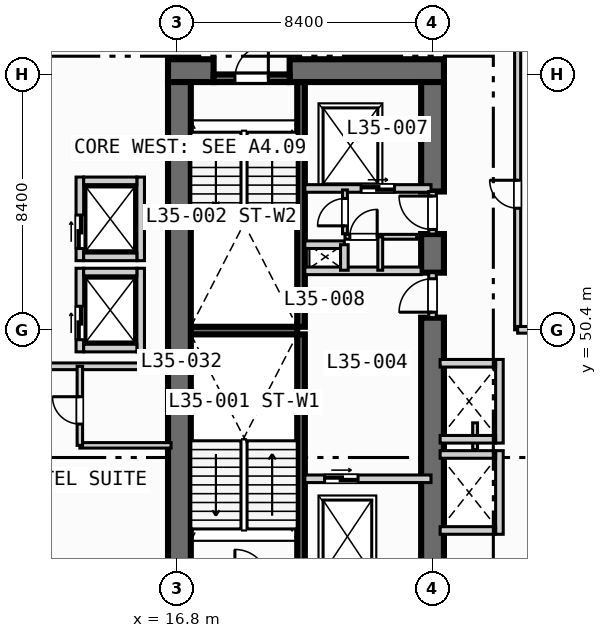
"""IFC4 building model, lengths in metres.
Left out: names, types, materials, properties, quantities, classifications, styles, units other than length and angle.
Written with IfcOpenShell. Run it as: python <this file> out.ifc"""

import sys

from ifc_helpers import new_model, si_unit, direction, frame, frame_2d, origin, place, context, subcontext, project, spatial, rectangle, extrude, element, fill, save


model = new_model("IFC4")
c1 = context("Model", 3, precision=1e-05, world=origin(), true_north=direction((0.0, 1.0)))
c2 = subcontext(c1, "Body", "Model", "MODEL_VIEW")
j1 = project(units=[si_unit("LENGTHUNIT", "METRE"), si_unit("PLANEANGLEUNIT", "RADIAN")], contexts=[c1])
p1 = place(None, origin())
s1 = spatial("IfcSite", under=j1, at=p1, CompositionType="ELEMENT")
p2 = place(p1, origin())
s2 = spatial("IfcBuilding", under=s1, at=p2, CompositionType="ELEMENT")
p3 = place(p2, frame((0.0, 0.0, 145.6)))
s3 = spatial("IfcBuildingStorey", under=s2, at=p3, CompositionType="ELEMENT", Elevation=145.6)
for number, where, z_axis, x_axis in (
    (1, (20.875, 42.2, 0.0), (0.0, 0.0, 1.0), (0.0, 1.0, 0.0)),
    (2, (20.875, 50.5, 0.0), (0.0, 0.0, 1.0), (0.0, 1.0, 0.0)),
):
    element("IfcWall", number, at=place(p3, frame(where, z_axis=z_axis, x_axis=x_axis)), inside=s3, PredefinedType="SOLIDWALL", context=c2, shape_type="SweptSolid", body=[
        extrude(rectangle(XDim=8.05, YDim=0.25, at=frame_2d((4.025, 0.0))), origin(), (0.0, 0.0, 1.0), 3.55),
    ])
p4 = place(p3, frame((17.25, 50.375, 0.0), z_axis=(0.0, 0.0, 1.0), x_axis=(1.0, 0.0, 0.0)))
e3 = element("IfcWall", 3, at=p4, inside=s3, PredefinedType="SOLIDWALL", context=c2, shape_type="SweptSolid", body=[
    extrude(rectangle(XDim=3.5, YDim=0.25, at=frame_2d((1.75, 0.0))), origin(), (0.0, 0.0, 1.0), 3.55),
])
p5 = place(p3, frame((16.5, 58.925, 0.0), z_axis=(0.0, 0.0, 1.0), x_axis=(1.0, 0.0, 0.0)))
e4 = element("IfcWall", 4, at=p5, inside=s3, PredefinedType="SHEAR", context=c2, shape_type="SweptSolid", body=[
    extrude(rectangle(XDim=1.5, YDim=0.75, at=frame_2d((0.75, 0.0))), origin(), (0.0, 0.0, 1.0), 3.55),
])
p6 = place(p3, frame((20.5, 58.925, 0.0), z_axis=(0.0, 0.0, 1.0), x_axis=(1.0, 0.0, 0.0)))
e5 = element("IfcWall", 5, at=p6, inside=s3, PredefinedType="SHEAR", context=c2, shape_type="SweptSolid", body=[
    extrude(rectangle(XDim=5.075, YDim=0.75, at=frame_2d((2.538, 0.0))), origin(), (0.0, 0.0, 1.0), 3.55),
])
p7 = place(p3, frame((16.875, 42.2, 0.0), z_axis=(0.0, 0.0, 1.0), x_axis=(0.0, 1.0, 0.0)))
e6 = element("IfcWall", 6, at=p7, inside=s3, PredefinedType="SHEAR", context=c2, shape_type="SweptSolid", body=[
    extrude(rectangle(XDim=16.35, YDim=0.75, at=frame_2d((8.175, 0.0))), origin(), (0.0, 0.0, 1.0), 3.55),
])
p8 = place(p3, frame((25.2, 42.2, 0.0), z_axis=(0.0, 0.0, 1.0), x_axis=(0.0, 1.0, 0.0)))
e7 = element("IfcWall", 7, at=p8, inside=s3, PredefinedType="SHEAR", context=c2, shape_type="SweptSolid", body=[
    extrude(rectangle(XDim=8.6, YDim=0.75, at=frame_2d((4.3, 0.0))), origin(), (0.0, 0.0, 1.0), 3.55),
])
p9 = place(p3, frame((25.2, 52.28, 0.0), z_axis=(0.0, 0.0, 1.0), x_axis=(0.0, 1.0, 0.0)))
e8 = element("IfcWall", 8, at=p9, inside=s3, PredefinedType="SHEAR", context=c2, shape_type="SweptSolid", body=[
    extrude(rectangle(XDim=1.27, YDim=0.75, at=frame_2d((0.635, 0.0))), origin(), (0.0, 0.0, 1.0), 3.55),
])
p10 = place(p3, frame((25.2, 54.95, 0.0), z_axis=(0.0, 0.0, 1.0), x_axis=(0.0, 1.0, 0.0)))
e9 = element("IfcWall", 9, at=p10, inside=s3, PredefinedType="SHEAR", context=c2, shape_type="SweptSolid", body=[
    extrude(rectangle(XDim=3.6, YDim=0.75, at=frame_2d((1.8, 0.0))), origin(), (0.0, 0.0, 1.0), 3.55),
])
p11 = place(p3, frame((18.0, 58.675, 0.0), z_axis=(0.0, 0.0, 1.0), x_axis=(1.0, 0.0, 0.0)))
e10 = element("IfcWall", 10, at=p11, inside=s3, PredefinedType="SOLIDWALL", context=c2, shape_type="SweptSolid", body=[
    extrude(rectangle(XDim=2.5, YDim=0.25, at=frame_2d((1.25, 0.0))), origin(), (0.0, 0.0, 1.0), 3.55),
])
p12 = place(p11, frame((0.7, 0.0, 0.0)))
e11 = element("IfcOpeningElement", 11, at=p12, cuts=e10, PredefinedType="OPENING", context=c2, shape_type="SweptSolid", body=[
    extrude(rectangle(XDim=1.1, YDim=2.15, at=frame_2d((0.55, 1.075))), frame((0.0, 0.135, 0.0), z_axis=(0.0, -1.0, 0.0), x_axis=(1.0, 0.0, 0.0)), (0.0, 0.0, 1.0), 0.27),
])
p13 = place(p3, frame((21.0, 45.5, 0.0), z_axis=(0.0, 0.0, 1.0), x_axis=(1.0, 0.0, 0.0)))
e12 = element("IfcWall", 12, at=p13, inside=s3, PredefinedType="SOLIDWALL", context=c2, shape_type="SweptSolid", body=[
    extrude(rectangle(XDim=4.15, YDim=0.25, at=frame_2d((2.075, 0.0))), origin(), (0.0, 0.0, 1.0), 3.55),
])
p14 = place(p13, frame((0.65, 0.0, 0.0)))
e13 = element("IfcOpeningElement", 13, at=p14, cuts=e12, PredefinedType="OPENING", context=c2, shape_type="SweptSolid", body=[
    extrude(rectangle(XDim=1.1, YDim=2.15, at=frame_2d((0.55, 1.075))), frame((0.0, 0.135, 0.0), z_axis=(0.0, -1.0, 0.0), x_axis=(1.0, 0.0, 0.0)), (0.0, 0.0, 1.0), 0.27),
])
p15 = place(p3, frame((25.2, 50.8, 0.0), z_axis=(0.0, 0.0, 1.0), x_axis=(0.0, 1.0, 0.0)))
e14 = element("IfcWall", 14, at=p15, inside=s3, PredefinedType="SOLIDWALL", context=c2, shape_type="SweptSolid", body=[
    extrude(rectangle(XDim=1.48, YDim=0.25, at=frame_2d((0.74, 0.0))), origin(), (0.0, 0.0, 1.0), 3.55),
])
p16 = place(p15, frame((0.18, 0.0, 0.0)))
e15 = element("IfcOpeningElement", 15, at=p16, cuts=e14, PredefinedType="OPENING", context=c2, shape_type="SweptSolid", body=[
    extrude(rectangle(XDim=1.1, YDim=2.15, at=frame_2d((0.55, 1.075))), frame((0.0, 0.135, 0.0), z_axis=(0.0, -1.0, 0.0), x_axis=(1.0, 0.0, 0.0)), (0.0, 0.0, 1.0), 0.27),
])
p17 = place(p3, frame((21.0, 52.34, 0.0), z_axis=(0.0, 0.0, 1.0), x_axis=(1.0, 0.0, 0.0)))
e16 = element("IfcWall", 16, at=p17, inside=s3, PredefinedType="SOLIDWALL", context=c2, shape_type="SweptSolid", body=[
    extrude(rectangle(XDim=3.825, YDim=0.25, at=frame_2d((1.913, 0.0))), origin(), (0.0, 0.0, 1.0), 3.55),
])
p18 = place(p3, frame((21.0, 55.05, 0.0), z_axis=(0.0, 0.0, 1.0), x_axis=(1.0, 0.0, 0.0)))
e17 = element("IfcWall", 17, at=p18, inside=s3, PredefinedType="SOLIDWALL", context=c2, shape_type="SweptSolid", body=[
    extrude(rectangle(XDim=4.15, YDim=0.25, at=frame_2d((2.075, 0.0))), origin(), (0.0, 0.0, 1.0), 3.55),
])
p19 = place(p18, frame((1.85, 0.0, 0.0)))
e18 = element("IfcOpeningElement", 18, at=p19, cuts=e17, PredefinedType="OPENING", context=c2, shape_type="SweptSolid", body=[
    extrude(rectangle(XDim=1.1, YDim=2.15, at=frame_2d((0.55, 1.075))), frame((0.0, 0.135, 0.0), z_axis=(0.0, -1.0, 0.0), x_axis=(1.0, 0.0, 0.0)), (0.0, 0.0, 1.0), 0.27),
])
p20 = place(p3, frame((25.2, 53.55, 0.0), z_axis=(0.0, 0.0, 1.0), x_axis=(0.0, 1.0, 0.0)))
e19 = element("IfcWall", 19, at=p20, inside=s3, PredefinedType="SOLIDWALL", context=c2, shape_type="SweptSolid", body=[
    extrude(rectangle(XDim=1.4, YDim=0.25, at=frame_2d((0.7, 0.0))), origin(), (0.0, 0.0, 1.0), 3.55),
])
p21 = place(p20, frame((0.15, 0.0, 0.0)))
e20 = element("IfcOpeningElement", 20, at=p21, cuts=e19, PredefinedType="OPENING", context=c2, shape_type="SweptSolid", body=[
    extrude(rectangle(XDim=1.1, YDim=2.15, at=frame_2d((0.55, 1.075))), frame((0.0, 0.135, 0.0), z_axis=(0.0, -1.0, 0.0), x_axis=(1.0, 0.0, 0.0)), (0.0, 0.0, 1.0), 0.27),
])
p22 = place(p3, frame((21.0, 53.2, 0.0), z_axis=(0.0, 0.0, 1.0), x_axis=(1.0, 0.0, 0.0)))
e21 = element("IfcWall", 21, at=p22, inside=s3, PredefinedType="SOLIDWALL", context=c2, shape_type="SweptSolid", body=[
    extrude(rectangle(XDim=1.3, YDim=0.25, at=frame_2d((0.65, 0.0))), origin(), (0.0, 0.0, 1.0), 3.55),
])
p23 = place(p3, frame((22.3, 52.36, 0.0), z_axis=(0.0, 0.0, 1.0), x_axis=(0.0, 1.0, 0.0)))
e22 = element("IfcWall", 22, at=p23, inside=s3, PredefinedType="SOLIDWALL", context=c2, shape_type="SweptSolid", body=[
    extrude(rectangle(XDim=0.84, YDim=0.25, at=frame_2d((0.42, 0.0))), origin(), (0.0, 0.0, 1.0), 3.55),
])
p24 = place(p3, frame((22.32, 53.56, 0.0), z_axis=(0.0, 0.0, 1.0), x_axis=(0.0, 1.0, 0.0)))
e23 = element("IfcWall", 23, at=p24, inside=s3, PredefinedType="PARTITIONING", context=c2, shape_type="SweptSolid", body=[
    extrude(rectangle(XDim=1.44, YDim=0.16, at=frame_2d((0.72, 0.0))), origin(), (0.0, 0.0, 1.0), 3.55),
])
p25 = place(p24, frame((0.26, 0.0, 0.0)))
e24 = element("IfcOpeningElement", 24, at=p25, cuts=e23, PredefinedType="OPENING", context=c2, shape_type="SweptSolid", body=[
    extrude(rectangle(XDim=0.9, YDim=2.1, at=frame_2d((0.45, 1.05))), frame((0.0, 0.09, 0.0), z_axis=(0.0, -1.0, 0.0), x_axis=(1.0, 0.0, 0.0)), (0.0, 0.0, 1.0), 0.18),
])
p26 = place(p3, frame((22.32, 53.46, 0.0), z_axis=(0.0, 0.0, 1.0), x_axis=(1.0, 0.0, 0.0)))
e25 = element("IfcWall", 25, at=p26, inside=s3, PredefinedType="PARTITIONING", context=c2, shape_type="SweptSolid", body=[
    extrude(rectangle(XDim=2.36, YDim=0.16, at=frame_2d((1.18, 0.0))), origin(), (0.0, 0.0, 1.0), 3.55),
])
p27 = place(p26, frame((0.16, 0.0, 0.0)))
e26 = element("IfcOpeningElement", 26, at=p27, cuts=e25, PredefinedType="OPENING", context=c2, shape_type="SweptSolid", body=[
    extrude(rectangle(XDim=0.9, YDim=2.1, at=frame_2d((0.45, 1.05))), frame((0.0, 0.09, 0.0), z_axis=(0.0, -1.0, 0.0), x_axis=(1.0, 0.0, 0.0)), (0.0, 0.0, 1.0), 0.18),
])
p28 = place(p3, frame((23.48, 52.36, 0.0), z_axis=(0.0, 0.0, 1.0), x_axis=(0.0, 1.0, 0.0)))
e27 = element("IfcWall", 27, at=p28, inside=s3, PredefinedType="PARTITIONING", context=c2, shape_type="SweptSolid", body=[
    extrude(rectangle(XDim=1.1, YDim=0.16, at=frame_2d((0.55, 0.0))), origin(), (0.0, 0.0, 1.0), 3.55),
])
p29 = place(p3, frame((13.6, 49.675, 0.0), z_axis=(0.0, 0.0, 1.0), x_axis=(0.0, 1.0, 0.0)))
e28 = element("IfcWall", 28, at=p29, inside=s3, PredefinedType="SOLIDWALL", context=c2, shape_type="SweptSolid", body=[
    extrude(rectangle(XDim=2.75, YDim=0.25, at=frame_2d((1.375, 0.0))), origin(), (0.0, 0.0, 1.0), 3.55),
])
p30 = place(p29, frame((0.4, 0.0, 0.0)))
e29 = element("IfcOpeningElement", 29, at=p30, cuts=e28, PredefinedType="OPENING", context=c2, shape_type="SweptSolid", body=[
    extrude(rectangle(XDim=1.1, YDim=2.15, at=frame_2d((0.55, 1.075))), frame((0.0, 0.135, 0.0), z_axis=(0.0, -1.0, 0.0), x_axis=(1.0, 0.0, 0.0)), (0.0, 0.0, 1.0), 0.27),
])
p31 = place(p3, frame((15.6, 49.675, 0.0), z_axis=(0.0, 0.0, 1.0), x_axis=(0.0, 1.0, 0.0)))
e30 = element("IfcWall", 30, at=p31, inside=s3, PredefinedType="SOLIDWALL", context=c2, shape_type="SweptSolid", body=[
    extrude(rectangle(XDim=2.75, YDim=0.25, at=frame_2d((1.375, 0.0))), origin(), (0.0, 0.0, 1.0), 3.55),
])
for number, where, z_axis, x_axis in (
    (31, (13.725, 49.8, 0.0), (0.0, 0.0, 1.0), (1.0, 0.0, 0.0)),
    (32, (13.725, 52.3, 0.0), (0.0, 0.0, 1.0), (1.0, 0.0, 0.0)),
):
    element("IfcWall", number, at=place(p3, frame(where, z_axis=z_axis, x_axis=x_axis)), inside=s3, PredefinedType="SOLIDWALL", context=c2, shape_type="SweptSolid", body=[
        extrude(rectangle(XDim=1.75, YDim=0.25, at=frame_2d((0.875, 0.0))), origin(), (0.0, 0.0, 1.0), 3.55),
    ])
p32 = place(p3, frame((13.6, 52.675, 0.0), z_axis=(0.0, 0.0, 1.0), x_axis=(0.0, 1.0, 0.0)))
e33 = element("IfcWall", 33, at=p32, inside=s3, PredefinedType="SOLIDWALL", context=c2, shape_type="SweptSolid", body=[
    extrude(rectangle(XDim=2.75, YDim=0.25, at=frame_2d((1.375, 0.0))), origin(), (0.0, 0.0, 1.0), 3.55),
])
p33 = place(p32, frame((0.4, 0.0, 0.0)))
e34 = element("IfcOpeningElement", 34, at=p33, cuts=e33, PredefinedType="OPENING", context=c2, shape_type="SweptSolid", body=[
    extrude(rectangle(XDim=1.1, YDim=2.15, at=frame_2d((0.55, 1.075))), frame((0.0, 0.135, 0.0), z_axis=(0.0, -1.0, 0.0), x_axis=(1.0, 0.0, 0.0)), (0.0, 0.0, 1.0), 0.27),
])
p34 = place(p3, frame((15.6, 52.675, 0.0), z_axis=(0.0, 0.0, 1.0), x_axis=(0.0, 1.0, 0.0)))
e35 = element("IfcWall", 35, at=p34, inside=s3, PredefinedType="SOLIDWALL", context=c2, shape_type="SweptSolid", body=[
    extrude(rectangle(XDim=2.75, YDim=0.25, at=frame_2d((1.375, 0.0))), origin(), (0.0, 0.0, 1.0), 3.55),
])
for number, where, z_axis, x_axis in (
    (36, (13.725, 52.8, 0.0), (0.0, 0.0, 1.0), (1.0, 0.0, 0.0)),
    (37, (13.725, 55.3, 0.0), (0.0, 0.0, 1.0), (1.0, 0.0, 0.0)),
):
    element("IfcWall", number, at=place(p3, frame(where, z_axis=z_axis, x_axis=x_axis)), inside=s3, PredefinedType="SOLIDWALL", context=c2, shape_type="SweptSolid", body=[
        extrude(rectangle(XDim=1.75, YDim=0.25, at=frame_2d((0.875, 0.0))), origin(), (0.0, 0.0, 1.0), 3.55),
    ])
p35 = place(p3, frame((27.4, 43.675, 0.0), z_axis=(0.0, 0.0, 1.0), x_axis=(0.0, 1.0, 0.0)))
e38 = element("IfcWall", 38, at=p35, inside=s3, PredefinedType="SOLIDWALL", context=c2, shape_type="SweptSolid", body=[
    extrude(rectangle(XDim=2.75, YDim=0.25, at=frame_2d((1.375, 0.0))), origin(), (0.0, 0.0, 1.0), 3.55),
])
for number, where, z_axis, x_axis in (
    (39, (25.45, 43.8, 0.0), (0.0, 0.0, 1.0), (1.0, 0.0, 0.0)),
    (40, (25.45, 46.3, 0.0), (0.0, 0.0, 1.0), (1.0, 0.0, 0.0)),
):
    element("IfcWall", number, at=place(p3, frame(where, z_axis=z_axis, x_axis=x_axis)), inside=s3, PredefinedType="SOLIDWALL", context=c2, shape_type="SweptSolid", body=[
        extrude(rectangle(XDim=1.825, YDim=0.25, at=frame_2d((0.913, 0.0))), origin(), (0.0, 0.0, 1.0), 3.55),
    ])
p36 = place(p3, frame((26.6, 46.46, 0.0), z_axis=(0.0, 0.0, 1.0), x_axis=(0.0, 1.0, 0.0)))
e41 = element("IfcWall", 41, at=p36, inside=s3, PredefinedType="PARTITIONING", context=c2, shape_type="SweptSolid", body=[
    extrude(rectangle(XDim=0.88, YDim=0.16, at=frame_2d((0.44, 0.0))), origin(), (0.0, 0.0, 1.0), 3.55),
])
p37 = place(p3, frame((27.4, 46.675, 0.0), z_axis=(0.0, 0.0, 1.0), x_axis=(0.0, 1.0, 0.0)))
e42 = element("IfcWall", 42, at=p37, inside=s3, PredefinedType="SOLIDWALL", context=c2, shape_type="SweptSolid", body=[
    extrude(rectangle(XDim=2.75, YDim=0.25, at=frame_2d((1.375, 0.0))), origin(), (0.0, 0.0, 1.0), 3.55),
])
for number, where, z_axis, x_axis in (
    (43, (25.45, 46.8, 0.0), (0.0, 0.0, 1.0), (1.0, 0.0, 0.0)),
    (44, (25.45, 49.3, 0.0), (0.0, 0.0, 1.0), (1.0, 0.0, 0.0)),
):
    element("IfcWall", number, at=place(p3, frame(where, z_axis=z_axis, x_axis=x_axis)), inside=s3, PredefinedType="SOLIDWALL", context=c2, shape_type="SweptSolid", body=[
        extrude(rectangle(XDim=1.825, YDim=0.25, at=frame_2d((0.913, 0.0))), origin(), (0.0, 0.0, 1.0), 3.55),
    ])
p38 = place(p3, frame((0.35, 49.2, 0.0), z_axis=(0.0, 0.0, 1.0), x_axis=(1.0, 0.0, 0.0)))
e45 = element("IfcWall", 45, at=p38, inside=s3, PredefinedType="PARTITIONING", context=c2, shape_type="SweptSolid", body=[
    extrude(rectangle(XDim=16.25, YDim=0.22, at=frame_2d((8.125, 0.0))), origin(), (0.0, 0.0, 1.0), 3.55),
])
p39 = place(p3, frame((13.6, 46.6, 0.0), z_axis=(0.0, 0.0, 1.0), x_axis=(1.0, 0.0, 0.0)))
e46 = element("IfcWall", 46, at=p39, inside=s3, PredefinedType="PLUMBINGWALL", context=c2, shape_type="SweptSolid", body=[
    extrude(rectangle(XDim=3.0, YDim=0.18, at=frame_2d((1.5, 0.0))), origin(), (0.0, 0.0, 1.0), 3.55),
])
p40 = place(p3, frame((13.6, 46.6, 0.0), z_axis=(0.0, 0.0, 1.0), x_axis=(0.0, 1.0, 0.0)))
e47 = element("IfcWall", 47, at=p40, inside=s3, PredefinedType="PLUMBINGWALL", context=c2, shape_type="SweptSolid", body=[
    extrude(rectangle(XDim=2.6, YDim=0.18, at=frame_2d((1.3, 0.0))), origin(), (0.0, 0.0, 1.0), 3.55),
])
p41 = place(p40, frame((0.7, 0.0, 0.0)))
e48 = element("IfcOpeningElement", 48, at=p41, cuts=e47, PredefinedType="OPENING", context=c2, shape_type="SweptSolid", body=[
    extrude(rectangle(XDim=0.9, YDim=2.1, at=frame_2d((0.45, 1.05))), frame((0.0, 0.1, 0.0), z_axis=(0.0, -1.0, 0.0), x_axis=(1.0, 0.0, 0.0)), (0.0, 0.0, 1.0), 0.2),
])
p42 = place(p3, frame((28.0, 50.4, 0.0), z_axis=(0.0, 0.0, 1.0), x_axis=(0.0, 1.0, 0.0)))
e49 = element("IfcWall", 49, at=p42, inside=s3, PredefinedType="PARTITIONING", context=c2, shape_type="SweptSolid", body=[
    extrude(rectangle(XDim=38.6, YDim=0.2, at=frame_2d((19.3, 0.0))), origin(), (0.0, 0.0, 1.0), 3.55),
])
p43 = place(p42, frame((4.0, 0.0, 0.0)))
e50 = element("IfcOpeningElement", 50, at=p43, cuts=e49, PredefinedType="OPENING", context=c2, shape_type="SweptSolid", body=[
    extrude(rectangle(XDim=0.92, YDim=2.1, at=frame_2d((0.46, 1.05))), frame((0.0, 0.11, 0.0), z_axis=(0.0, -1.0, 0.0), x_axis=(1.0, 0.0, 0.0)), (0.0, 0.0, 1.0), 0.22),
])
p44 = place(p3, frame((28.0, 50.4, 0.0), z_axis=(0.0, 0.0, 1.0), x_axis=(1.0, 0.0, 0.0)))
e51 = element("IfcWall", 51, at=p44, inside=s3, PredefinedType="PARTITIONING", context=c2, shape_type="SweptSolid", body=[
    extrude(rectangle(XDim=5.3, YDim=0.22, at=frame_2d((2.65, 0.0))), origin(), (0.0, 0.0, 1.0), 2.8),
])
p45 = place(p12, origin())
e52 = element("IfcDoor", 52, at=p45, inside=s3, OperationType="SINGLE_SWING_RIGHT", PredefinedType="DOOR", context=c2, shape_type="SweptSolid", body=[
    extrude(rectangle(XDim=1.1, YDim=2.15, at=frame_2d((0.55, 1.075))), frame((0.0, 0.025, 0.0), z_axis=(0.0, -1.0, 0.0), x_axis=(1.0, 0.0, 0.0)), (0.0, 0.0, 1.0), 0.05),
])
fill(e11, e52)
p46 = place(p14, origin())
e53 = element("IfcDoor", 53, at=p46, inside=s3, OperationType="SLIDING_TO_LEFT", PredefinedType="DOOR", context=c2, shape_type="SweptSolid", body=[
    extrude(rectangle(XDim=1.1, YDim=2.15, at=frame_2d((0.55, 1.075))), frame((0.0, 0.025, 0.0), z_axis=(0.0, -1.0, 0.0), x_axis=(1.0, 0.0, 0.0)), (0.0, 0.0, 1.0), 0.05),
])
fill(e13, e53)
p47 = place(p16, origin())
e54 = element("IfcDoor", 54, at=p47, inside=s3, OperationType="SINGLE_SWING_LEFT", PredefinedType="DOOR", context=c2, shape_type="SweptSolid", body=[
    extrude(rectangle(XDim=1.1, YDim=2.15, at=frame_2d((0.55, 1.075))), frame((0.0, 0.025, 0.0), z_axis=(0.0, -1.0, 0.0), x_axis=(1.0, 0.0, 0.0)), (0.0, 0.0, 1.0), 0.05),
])
fill(e15, e54)
p48 = place(p19, origin())
e55 = element("IfcDoor", 55, at=p48, inside=s3, OperationType="SLIDING_TO_LEFT", PredefinedType="DOOR", context=c2, shape_type="SweptSolid", body=[
    extrude(rectangle(XDim=1.1, YDim=2.15, at=frame_2d((0.55, 1.075))), frame((0.0, 0.025, 0.0), z_axis=(0.0, -1.0, 0.0), x_axis=(1.0, 0.0, 0.0)), (0.0, 0.0, 1.0), 0.05),
])
fill(e18, e55)
p49 = place(p21, origin())
e56 = element("IfcDoor", 56, at=p49, inside=s3, OperationType="SINGLE_SWING_RIGHT", PredefinedType="DOOR", context=c2, shape_type="SweptSolid", body=[
    extrude(rectangle(XDim=1.1, YDim=2.15, at=frame_2d((0.55, 1.075))), frame((0.0, 0.025, 0.0), z_axis=(0.0, -1.0, 0.0), x_axis=(1.0, 0.0, 0.0)), (0.0, 0.0, 1.0), 0.05),
])
fill(e20, e56)
p50 = place(p25, origin())
e57 = element("IfcDoor", 57, at=p50, inside=s3, OperationType="SINGLE_SWING_LEFT", PredefinedType="DOOR", context=c2, shape_type="SweptSolid", body=[
    extrude(rectangle(XDim=0.9, YDim=2.1, at=frame_2d((0.45, 1.05))), frame((0.0, 0.025, 0.0), z_axis=(0.0, -1.0, 0.0), x_axis=(1.0, 0.0, 0.0)), (0.0, 0.0, 1.0), 0.05),
])
fill(e24, e57)
p51 = place(p27, origin())
e58 = element("IfcDoor", 58, at=p51, inside=s3, OperationType="SINGLE_SWING_RIGHT", PredefinedType="DOOR", context=c2, shape_type="SweptSolid", body=[
    extrude(rectangle(XDim=0.9, YDim=2.1, at=frame_2d((0.45, 1.05))), frame((0.0, 0.025, 0.0), z_axis=(0.0, -1.0, 0.0), x_axis=(1.0, 0.0, 0.0)), (0.0, 0.0, 1.0), 0.05),
])
fill(e26, e58)
p52 = place(p30, origin())
e59 = element("IfcDoor", 59, at=p52, inside=s3, OperationType="SLIDING_TO_LEFT", PredefinedType="DOOR", context=c2, shape_type="SweptSolid", body=[
    extrude(rectangle(XDim=1.1, YDim=2.15, at=frame_2d((0.55, 1.075))), frame((0.0, 0.025, 0.0), z_axis=(0.0, -1.0, 0.0), x_axis=(1.0, 0.0, 0.0)), (0.0, 0.0, 1.0), 0.05),
])
fill(e29, e59)
p53 = place(p33, origin())
e60 = element("IfcDoor", 60, at=p53, inside=s3, OperationType="SLIDING_TO_LEFT", PredefinedType="DOOR", context=c2, shape_type="SweptSolid", body=[
    extrude(rectangle(XDim=1.1, YDim=2.15, at=frame_2d((0.55, 1.075))), frame((0.0, 0.025, 0.0), z_axis=(0.0, -1.0, 0.0), x_axis=(1.0, 0.0, 0.0)), (0.0, 0.0, 1.0), 0.05),
])
fill(e34, e60)
p54 = place(p41, origin())
e61 = element("IfcDoor", 61, at=p54, inside=s3, OperationType="SINGLE_SWING_RIGHT", PredefinedType="DOOR", context=c2, shape_type="SweptSolid", body=[
    extrude(rectangle(XDim=0.9, YDim=2.1, at=frame_2d((0.45, 1.05))), frame((0.0, 0.025, 0.0), z_axis=(0.0, -1.0, 0.0), x_axis=(1.0, 0.0, 0.0)), (0.0, 0.0, 1.0), 0.05),
])
fill(e48, e61)
p55 = place(p43, origin())
e62 = element("IfcDoor", 62, at=p55, inside=s3, OperationType="SINGLE_SWING_RIGHT", PredefinedType="DOOR", context=c2, shape_type="SweptSolid", body=[
    extrude(rectangle(XDim=0.92, YDim=2.1, at=frame_2d((0.46, 1.05))), frame((0.0, 0.025, 0.0), z_axis=(0.0, -1.0, 0.0), x_axis=(1.0, 0.0, 0.0)), (0.0, 0.0, 1.0), 0.05),
])
fill(e50, e62)
save(model, sys.argv[1])
